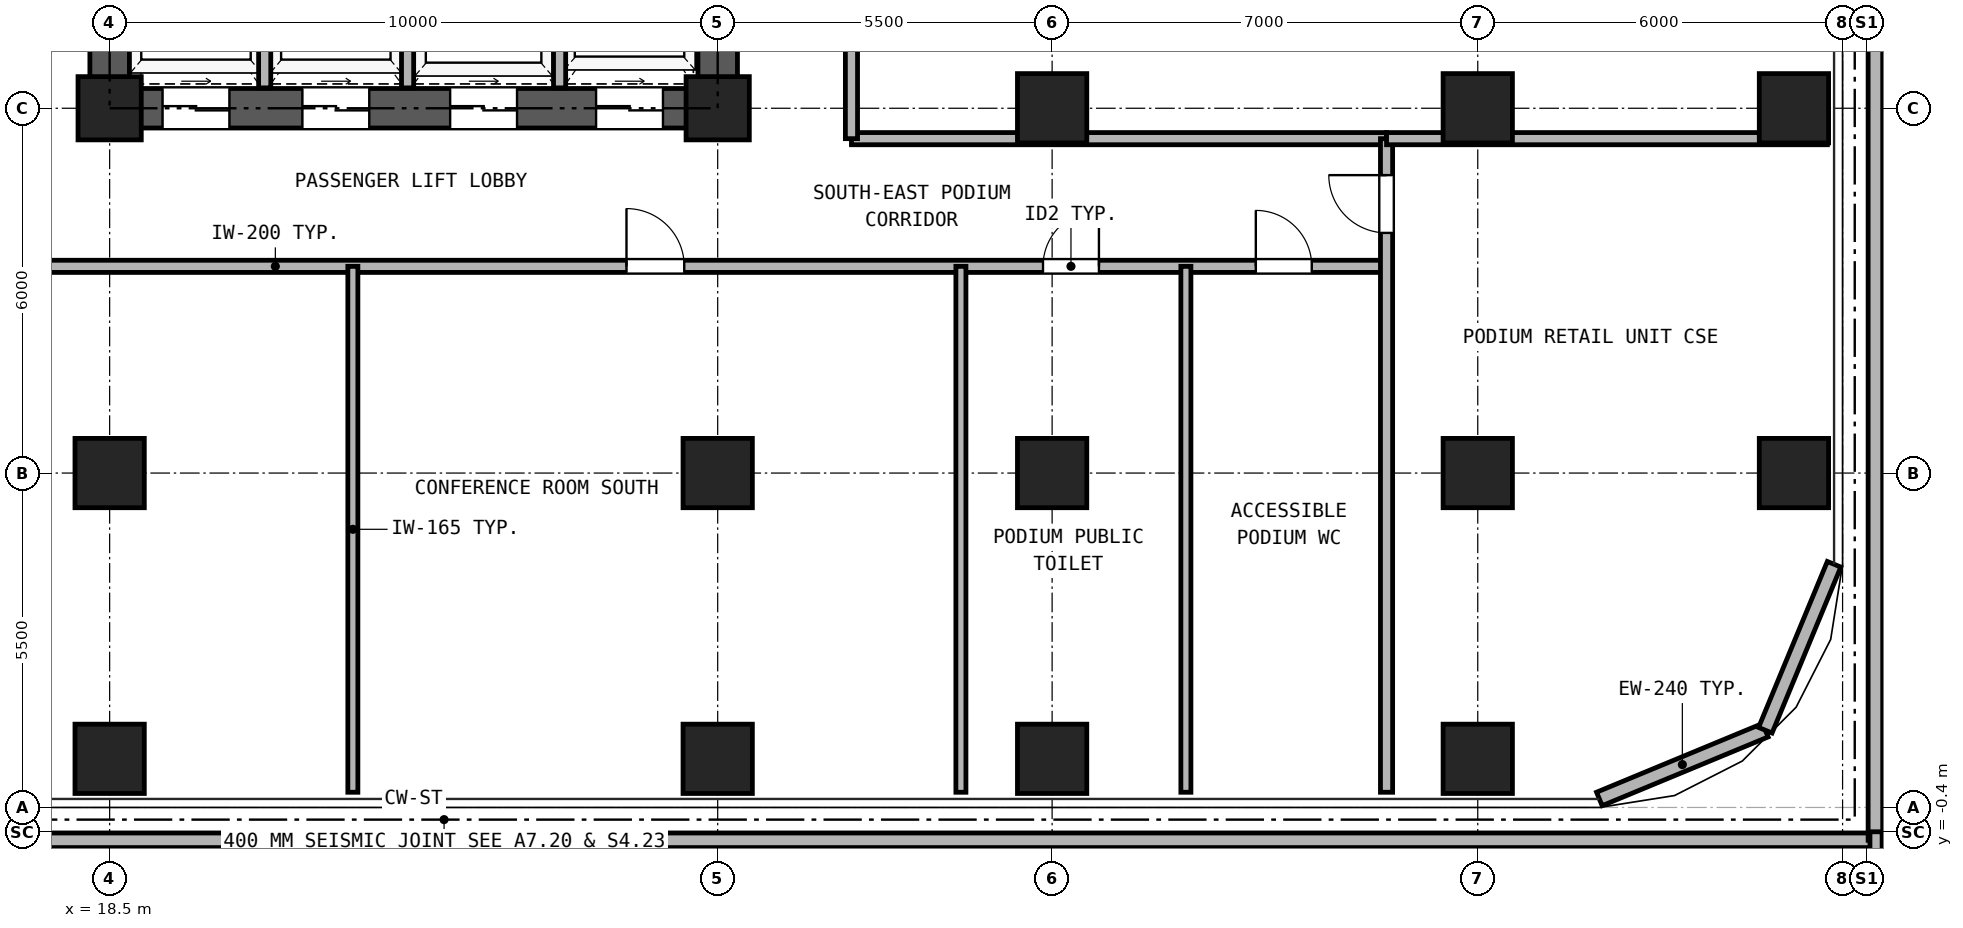
"""IFC4 building model, lengths in metres.
Left out: names, types, materials, properties, quantities, classifications, styles, units other than length and angle.
Written with IfcOpenShell. Run it as: python <this file> out.ifc"""

import sys

from ifc_helpers import new_model, si_unit, direction, frame, frame_2d, origin, origin_2d, place, context, subcontext, project, spatial, rectangle, hollow_rectangle, extrude, source, transform, mapped, element, fill, save


model = new_model("IFC4")
c1 = context("Model", 3, precision=1e-05, world=origin(), true_north=direction((0.0, 1.0)))
c2 = subcontext(c1, "Body", "Model", "MODEL_VIEW")
j1 = project(units=[si_unit("LENGTHUNIT", "METRE"), si_unit("PLANEANGLEUNIT", "RADIAN")], contexts=[c1])
p1 = place(None, origin())
s1 = spatial("IfcSite", under=j1, at=p1, CompositionType="ELEMENT")
p2 = place(p1, origin())
s2 = spatial("IfcBuilding", under=s1, at=p2, CompositionType="ELEMENT")
p3 = place(p2, frame((0.0, 0.0, 9.0)))
s3 = spatial("IfcBuildingStorey", under=s2, at=p3, CompositionType="ELEMENT", Elevation=9.0)
m1 = source(origin(), c2, "Body", "SweptSolid", [
    extrude(hollow_rectangle(XDim=1.14, YDim=1.14, WallThickness=0.07, at=origin_2d()), origin(), (0.0, 0.0, 1.0), 4.18),
])
for number, where, z_axis, x_axis in (
    (1, (18.5, 0.8, 0.0), (0.0, 0.0, 1.0), (1.0, 0.0, 0.0)),
    (2, (28.5, 0.8, 0.0), (0.0, 0.0, 1.0), (1.0, 0.0, 0.0)),
    (3, (34.0, 0.8, 0.0), (0.0, 0.0, 1.0), (1.0, 0.0, 0.0)),
    (4, (41.0, 0.8, 0.0), (0.0, 0.0, 1.0), (1.0, 0.0, 0.0)),
    (5, (46.2, 5.5, 0.0), (0.0, 0.0, 1.0), (1.0, 0.0, 0.0)),
    (6, (46.2, 11.5, 0.0), (0.0, 0.0, 1.0), (1.0, 0.0, 0.0)),
    (7, (18.5, 5.5, 0.0), (0.0, 0.0, 1.0), (1.0, 0.0, 0.0)),
):
    element("IfcColumn", number, at=place(p3, frame(where, z_axis=z_axis, x_axis=x_axis)), inside=s3, PredefinedType="COLUMN", context=c2, shape_type="MappedRepresentation", body=[
        mapped(m1, transform((0.0, 0.0, 0.0), x_axis=(1.0, 0.0, 0.0), y_axis=(0.0, 1.0, 0.0), z_axis=(0.0, 0.0, 1.0), scale=1.0)),
    ])
m2 = source(origin(), c2, "Body", "SweptSolid", [
    extrude(hollow_rectangle(XDim=1.04, YDim=1.04, WallThickness=0.065, at=origin_2d()), origin(), (0.0, 0.0, 1.0), 4.18),
])
p4 = place(p3, frame((18.5, 11.5, 0.0), z_axis=(0.0, 0.0, 1.0), x_axis=(1.0, 0.0, 0.0)))
e8 = element("IfcColumn", 8, at=p4, inside=s3, PredefinedType="COLUMN", context=c2, shape_type="MappedRepresentation", body=[
    mapped(m2, transform((0.0, 0.0, 0.0), x_axis=(1.0, 0.0, 0.0), y_axis=(0.0, 1.0, 0.0), z_axis=(0.0, 0.0, 1.0), scale=1.0)),
])
p5 = place(p3, frame((28.5, 5.5, 0.0), z_axis=(0.0, 0.0, 1.0), x_axis=(1.0, 0.0, 0.0)))
e9 = element("IfcColumn", 9, at=p5, inside=s3, PredefinedType="COLUMN", context=c2, shape_type="MappedRepresentation", body=[
    mapped(m1, transform((0.0, 0.0, 0.0), x_axis=(1.0, 0.0, 0.0), y_axis=(0.0, 1.0, 0.0), z_axis=(0.0, 0.0, 1.0), scale=1.0)),
])
p6 = place(p3, frame((28.5, 11.5, 0.0), z_axis=(0.0, 0.0, 1.0), x_axis=(1.0, 0.0, 0.0)))
e10 = element("IfcColumn", 10, at=p6, inside=s3, PredefinedType="COLUMN", context=c2, shape_type="MappedRepresentation", body=[
    mapped(m2, transform((0.0, 0.0, 0.0), x_axis=(1.0, 0.0, 0.0), y_axis=(0.0, 1.0, 0.0), z_axis=(0.0, 0.0, 1.0), scale=1.0)),
])
for number, where, z_axis, x_axis in (
    (11, (34.0, 5.5, 0.0), (0.0, 0.0, 1.0), (1.0, 0.0, 0.0)),
    (12, (34.0, 11.5, 0.0), (0.0, 0.0, 1.0), (1.0, 0.0, 0.0)),
    (13, (41.0, 5.5, 0.0), (0.0, 0.0, 1.0), (1.0, 0.0, 0.0)),
    (14, (41.0, 11.5, 0.0), (0.0, 0.0, 1.0), (1.0, 0.0, 0.0)),
):
    element("IfcColumn", number, at=place(p3, frame(where, z_axis=z_axis, x_axis=x_axis)), inside=s3, PredefinedType="COLUMN", context=c2, shape_type="MappedRepresentation", body=[
        mapped(m1, transform((0.0, 0.0, 0.0), x_axis=(1.0, 0.0, 0.0), y_axis=(0.0, 1.0, 0.0), z_axis=(0.0, 0.0, 1.0), scale=1.0)),
    ])
for number, where, z_axis, x_axis in (
    (15, (43.0, 0.14, 0.0), (0.0, 0.0, 1.0), (0.924, 0.383, 0.0)),
    (16, (45.729, 1.271, 0.0), (0.0, 0.0, 1.0), (0.383, 0.924, 0.0)),
):
    element("IfcWall", number, at=place(p3, frame(where, z_axis=z_axis, x_axis=x_axis)), inside=s3, PredefinedType="SOLIDWALL", context=c2, shape_type="SweptSolid", body=[
        extrude(rectangle(XDim=2.954, YDim=0.24, at=frame_2d((1.477, 0.0))), origin(), (0.0, 0.0, 1.0), 4.18),
    ])
p7 = place(p3, frame((0.2, -0.54, 0.0), z_axis=(0.0, 0.0, 1.0), x_axis=(1.0, 0.0, 0.0)))
e17 = element("IfcWall", 17, at=p7, inside=s3, PredefinedType="SOLIDWALL", context=c2, shape_type="SweptSolid", body=[
    extrude(rectangle(XDim=47.34, YDim=0.24, at=frame_2d((23.67, 0.0))), origin(), (0.0, 0.0, 1.0), 4.18),
])
p8 = place(p3, frame((47.54, -0.54, 0.0), z_axis=(0.0, 0.0, 1.0), x_axis=(0.0, 1.0, 0.0)))
e18 = element("IfcWall", 18, at=p8, inside=s3, PredefinedType="SOLIDWALL", context=c2, shape_type="SweptSolid", body=[
    extrude(rectangle(XDim=40.89, YDim=0.24, at=frame_2d((20.445, 0.0))), origin(), (0.0, 0.0, 1.0), 4.18),
])
p9 = place(p3, frame((18.175, 11.5, 0.0), z_axis=(0.0, 0.0, 1.0), x_axis=(1.0, 0.0, 0.0)))
e19 = element("IfcWall", 19, at=p9, inside=s3, PredefinedType="SHEAR", context=c2, shape_type="SweptSolid", body=[
    extrude(rectangle(XDim=10.65, YDim=0.65, at=frame_2d((5.325, 0.0))), origin(), (0.0, 0.0, 1.0), 4.18),
])
p10 = place(p9, frame((1.195, 0.0, 0.0)))
e20 = element("IfcOpeningElement", 20, at=p10, cuts=e19, PredefinedType="OPENING", context=c2, shape_type="SweptSolid", body=[
    extrude(rectangle(XDim=1.1, YDim=2.25, at=frame_2d((0.55, 1.125))), frame((0.0, 0.335, 0.0), z_axis=(0.0, -1.0, 0.0), x_axis=(1.0, 0.0, 0.0)), (0.0, 0.0, 1.0), 0.67),
])
p11 = place(p9, frame((3.495, 0.0, 0.0)))
e21 = element("IfcOpeningElement", 21, at=p11, cuts=e19, PredefinedType="OPENING", context=c2, shape_type="SweptSolid", body=[
    extrude(rectangle(XDim=1.1, YDim=2.25, at=frame_2d((0.55, 1.125))), frame((0.0, 0.335, 0.0), z_axis=(0.0, -1.0, 0.0), x_axis=(1.0, 0.0, 0.0)), (0.0, 0.0, 1.0), 0.67),
])
p12 = place(p9, frame((5.925, 0.0, 0.0)))
e22 = element("IfcOpeningElement", 22, at=p12, cuts=e19, PredefinedType="OPENING", context=c2, shape_type="SweptSolid", body=[
    extrude(rectangle(XDim=1.1, YDim=2.25, at=frame_2d((0.55, 1.125))), frame((0.0, 0.335, 0.0), z_axis=(0.0, -1.0, 0.0), x_axis=(1.0, 0.0, 0.0)), (0.0, 0.0, 1.0), 0.67),
])
p13 = place(p9, frame((8.325, 0.0, 0.0)))
e23 = element("IfcOpeningElement", 23, at=p13, cuts=e19, PredefinedType="OPENING", context=c2, shape_type="SweptSolid", body=[
    extrude(rectangle(XDim=1.1, YDim=2.25, at=frame_2d((0.55, 1.125))), frame((0.0, 0.335, 0.0), z_axis=(0.0, -1.0, 0.0), x_axis=(1.0, 0.0, 0.0)), (0.0, 0.0, 1.0), 0.67),
])
p14 = place(p3, frame((18.5, 11.825, 0.0), z_axis=(0.0, 0.0, 1.0), x_axis=(0.0, 1.0, 0.0)))
e24 = element("IfcWall", 24, at=p14, inside=s3, PredefinedType="SHEAR", context=c2, shape_type="SweptSolid", body=[
    extrude(rectangle(XDim=16.6, YDim=0.65, at=frame_2d((8.3, 0.0))), origin(), (0.0, 0.0, 1.0), 4.18),
])
p15 = place(p14, frame((7.325, 0.0, 0.0)))
e25 = element("IfcOpeningElement", 25, at=p15, cuts=e24, PredefinedType="OPENING", context=c2, shape_type="SweptSolid", body=[
    extrude(rectangle(XDim=1.15, YDim=2.2, at=frame_2d((0.575, 1.1))), frame((0.0, 0.335, 0.0), z_axis=(0.0, -1.0, 0.0), x_axis=(1.0, 0.0, 0.0)), (0.0, 0.0, 1.0), 0.67),
])
p16 = place(p3, frame((28.5, 11.825, 0.0), z_axis=(0.0, 0.0, 1.0), x_axis=(0.0, 1.0, 0.0)))
e26 = element("IfcWall", 26, at=p16, inside=s3, PredefinedType="SHEAR", context=c2, shape_type="SweptSolid", body=[
    extrude(rectangle(XDim=16.6, YDim=0.65, at=frame_2d((8.3, 0.0))), origin(), (0.0, 0.0, 1.0), 4.18),
])
p17 = place(p16, frame((7.325, 0.0, 0.0)))
e27 = element("IfcOpeningElement", 27, at=p17, cuts=e26, PredefinedType="OPENING", context=c2, shape_type="SweptSolid", body=[
    extrude(rectangle(XDim=1.15, YDim=2.2, at=frame_2d((0.575, 1.1))), frame((0.0, 0.335, 0.0), z_axis=(0.0, -1.0, 0.0), x_axis=(1.0, 0.0, 0.0)), (0.0, 0.0, 1.0), 0.67),
])
for number, where, z_axis, x_axis in (
    (28, (21.05, 11.835, 0.0), (0.0, 0.0, 1.0), (0.0, 1.0, 0.0)),
    (29, (23.4, 11.835, 0.0), (0.0, 0.0, 1.0), (0.0, 1.0, 0.0)),
    (30, (25.9, 11.835, 0.0), (0.0, 0.0, 1.0), (0.0, 1.0, 0.0)),
):
    element("IfcWall", number, at=place(p3, frame(where, z_axis=z_axis, x_axis=x_axis)), inside=s3, PredefinedType="PARTITIONING", context=c2, shape_type="SweptSolid", body=[
        extrude(rectangle(XDim=3.165, YDim=0.2, at=frame_2d((1.583, 0.0))), origin(), (0.0, 0.0, 1.0), 4.18),
    ])
p18 = place(p3, frame((7.5, 8.9, 0.0), z_axis=(0.0, 0.0, 1.0), x_axis=(1.0, 0.0, 0.0)))
e31 = element("IfcWall", 31, at=p18, inside=s3, PredefinedType="PARTITIONING", context=c2, shape_type="SweptSolid", body=[
    extrude(rectangle(XDim=32.0, YDim=0.2, at=frame_2d((16.0, 0.0))), origin(), (0.0, 0.0, 1.0), 4.18),
])
p19 = place(p18, frame((7.0, 0.0, 0.0)))
e32 = element("IfcOpeningElement", 32, at=p19, cuts=e31, PredefinedType="OPENING", context=c2, shape_type="SweptSolid", body=[
    extrude(rectangle(XDim=0.95, YDim=2.15, at=frame_2d((0.475, 1.075))), frame((0.0, 0.11, 0.0), z_axis=(0.0, -1.0, 0.0), x_axis=(1.0, 0.0, 0.0)), (0.0, 0.0, 1.0), 0.22),
])
p20 = place(p18, frame((19.5, 0.0, 0.0)))
e33 = element("IfcOpeningElement", 33, at=p20, cuts=e31, PredefinedType="OPENING", context=c2, shape_type="SweptSolid", body=[
    extrude(rectangle(XDim=0.95, YDim=2.15, at=frame_2d((0.475, 1.075))), frame((0.0, 0.11, 0.0), z_axis=(0.0, -1.0, 0.0), x_axis=(1.0, 0.0, 0.0)), (0.0, 0.0, 1.0), 0.22),
])
p21 = place(p18, frame((26.35, 0.0, 0.0)))
e34 = element("IfcOpeningElement", 34, at=p21, cuts=e31, PredefinedType="OPENING", context=c2, shape_type="SweptSolid", body=[
    extrude(rectangle(XDim=0.92, YDim=2.1, at=frame_2d((0.46, 1.05))), frame((0.0, 0.11, 0.0), z_axis=(0.0, -1.0, 0.0), x_axis=(1.0, 0.0, 0.0)), (0.0, 0.0, 1.0), 0.22),
])
p22 = place(p18, frame((29.85, 0.0, 0.0)))
e35 = element("IfcOpeningElement", 35, at=p22, cuts=e31, PredefinedType="OPENING", context=c2, shape_type="SweptSolid", body=[
    extrude(rectangle(XDim=0.92, YDim=2.1, at=frame_2d((0.46, 1.05))), frame((0.0, 0.11, 0.0), z_axis=(0.0, -1.0, 0.0), x_axis=(1.0, 0.0, 0.0)), (0.0, 0.0, 1.0), 0.22),
])
p23 = place(p3, frame((30.7, 11.0, 0.0), z_axis=(0.0, 0.0, 1.0), x_axis=(1.0, 0.0, 0.0)))
e36 = element("IfcWall", 36, at=p23, inside=s3, PredefinedType="PARTITIONING", context=c2, shape_type="SweptSolid", body=[
    extrude(rectangle(XDim=8.8, YDim=0.2, at=frame_2d((4.4, 0.0))), origin(), (0.0, 0.0, 1.0), 4.18),
])
p24 = place(p3, frame((30.7, 11.0, 0.0), z_axis=(0.0, 0.0, 1.0), x_axis=(0.0, 1.0, 0.0)))
e37 = element("IfcWall", 37, at=p24, inside=s3, PredefinedType="PARTITIONING", context=c2, shape_type="SweptSolid", body=[
    extrude(rectangle(XDim=18.25, YDim=0.2, at=frame_2d((9.125, 0.0))), origin(), (0.0, 0.0, 1.0), 4.18),
])
p25 = place(p24, frame((8.625, 0.0, 0.0)))
e38 = element("IfcOpeningElement", 38, at=p25, cuts=e37, PredefinedType="OPENING", context=c2, shape_type="SweptSolid", body=[
    extrude(rectangle(XDim=0.95, YDim=2.15, at=frame_2d((0.475, 1.075))), frame((0.0, 0.11, 0.0), z_axis=(0.0, -1.0, 0.0), x_axis=(1.0, 0.0, 0.0)), (0.0, 0.0, 1.0), 0.22),
])
p26 = place(p3, frame((39.5, 0.25, 0.0), z_axis=(0.0, 0.0, 1.0), x_axis=(0.0, 1.0, 0.0)))
e39 = element("IfcWall", 39, at=p26, inside=s3, PredefinedType="PARTITIONING", context=c2, shape_type="SweptSolid", body=[
    extrude(rectangle(XDim=10.75, YDim=0.2, at=frame_2d((5.375, 0.0))), origin(), (0.0, 0.0, 1.0), 4.18),
])
p27 = place(p26, frame((9.2, 0.0, 0.0)))
e40 = element("IfcOpeningElement", 40, at=p27, cuts=e39, PredefinedType="OPENING", context=c2, shape_type="SweptSolid", body=[
    extrude(rectangle(XDim=0.95, YDim=2.15, at=frame_2d((0.475, 1.075))), frame((0.0, 0.11, 0.0), z_axis=(0.0, -1.0, 0.0), x_axis=(1.0, 0.0, 0.0)), (0.0, 0.0, 1.0), 0.22),
])
p28 = place(p3, frame((39.5, 11.0, 0.0), z_axis=(0.0, 0.0, 1.0), x_axis=(1.0, 0.0, 0.0)))
e41 = element("IfcWall", 41, at=p28, inside=s3, PredefinedType="PARTITIONING", context=c2, shape_type="SweptSolid", body=[
    extrude(rectangle(XDim=7.25, YDim=0.2, at=frame_2d((3.625, 0.0))), origin(), (0.0, 0.0, 1.0), 4.18),
])
for number, where, z_axis, x_axis in (
    (42, (22.5, 0.25, 0.0), (0.0, 0.0, 1.0), (0.0, 1.0, 0.0)),
    (43, (32.5, 0.25, 0.0), (0.0, 0.0, 1.0), (0.0, 1.0, 0.0)),
    (44, (36.2, 0.25, 0.0), (0.0, 0.0, 1.0), (0.0, 1.0, 0.0)),
):
    element("IfcWall", number, at=place(p3, frame(where, z_axis=z_axis, x_axis=x_axis)), inside=s3, PredefinedType="PARTITIONING", context=c2, shape_type="SweptSolid", body=[
        extrude(rectangle(XDim=8.65, YDim=0.165, at=frame_2d((4.325, 0.0))), origin(), (0.0, 0.0, 1.0), 4.18),
    ])
p29 = place(p3, frame((47.55, -10.95, 0.0), z_axis=(0.0, 0.0, 1.0), x_axis=(0.0, 1.0, 0.0)))
e45 = element("IfcWall", 45, at=p29, inside=s3, PredefinedType="PARTITIONING", context=c2, shape_type="SweptSolid", body=[
    extrude(rectangle(XDim=10.55, YDim=0.2, at=frame_2d((5.275, 0.0))), origin(), (0.0, 0.0, 1.0), 4.18),
])
p30 = place(p29, frame((5.35, 0.0, 0.0)))
e46 = element("IfcOpeningElement", 46, at=p30, cuts=e45, PredefinedType="OPENING", context=c2, shape_type="SweptSolid", body=[
    extrude(rectangle(XDim=1.3, YDim=2.2, at=frame_2d((0.65, 1.1))), frame((0.0, 0.11, 0.0), z_axis=(0.0, -1.0, 0.0), x_axis=(1.0, 0.0, 0.0)), (0.0, 0.0, 1.0), 0.22),
])
p31 = place(p10, frame((1.1, 0.0, 0.0), z_axis=(0.0, 0.0, 1.0), x_axis=(-1.0, 0.0, 0.0)))
e47 = element("IfcDoor", 47, at=p31, inside=s3, OperationType="DOUBLE_DOOR_SLIDING", PredefinedType="DOOR", context=c2, shape_type="SweptSolid", body=[
    extrude(rectangle(XDim=1.1, YDim=2.25, at=frame_2d((0.55, 1.125))), frame((0.0, 0.025, 0.0), z_axis=(0.0, -1.0, 0.0), x_axis=(1.0, 0.0, 0.0)), (0.0, 0.0, 1.0), 0.05),
])
fill(e20, e47)
p32 = place(p11, frame((1.1, 0.0, 0.0), z_axis=(0.0, 0.0, 1.0), x_axis=(-1.0, 0.0, 0.0)))
e48 = element("IfcDoor", 48, at=p32, inside=s3, OperationType="DOUBLE_DOOR_SLIDING", PredefinedType="DOOR", context=c2, shape_type="SweptSolid", body=[
    extrude(rectangle(XDim=1.1, YDim=2.25, at=frame_2d((0.55, 1.125))), frame((0.0, 0.025, 0.0), z_axis=(0.0, -1.0, 0.0), x_axis=(1.0, 0.0, 0.0)), (0.0, 0.0, 1.0), 0.05),
])
fill(e21, e48)
p33 = place(p12, frame((1.1, 0.0, 0.0), z_axis=(0.0, 0.0, 1.0), x_axis=(-1.0, 0.0, 0.0)))
e49 = element("IfcDoor", 49, at=p33, inside=s3, OperationType="DOUBLE_DOOR_SLIDING", PredefinedType="DOOR", context=c2, shape_type="SweptSolid", body=[
    extrude(rectangle(XDim=1.1, YDim=2.25, at=frame_2d((0.55, 1.125))), frame((0.0, 0.025, 0.0), z_axis=(0.0, -1.0, 0.0), x_axis=(1.0, 0.0, 0.0)), (0.0, 0.0, 1.0), 0.05),
])
fill(e22, e49)
p34 = place(p13, frame((1.1, 0.0, 0.0), z_axis=(0.0, 0.0, 1.0), x_axis=(-1.0, 0.0, 0.0)))
e50 = element("IfcDoor", 50, at=p34, inside=s3, OperationType="DOUBLE_DOOR_SLIDING", PredefinedType="DOOR", context=c2, shape_type="SweptSolid", body=[
    extrude(rectangle(XDim=1.1, YDim=2.25, at=frame_2d((0.55, 1.125))), frame((0.0, 0.025, 0.0), z_axis=(0.0, -1.0, 0.0), x_axis=(1.0, 0.0, 0.0)), (0.0, 0.0, 1.0), 0.05),
])
fill(e23, e50)
p35 = place(p20, frame((0.95, 0.0, 0.0), z_axis=(0.0, 0.0, 1.0), x_axis=(-1.0, 0.0, 0.0)))
e51 = element("IfcDoor", 51, at=p35, inside=s3, OperationType="SINGLE_SWING_LEFT", PredefinedType="DOOR", context=c2, shape_type="SweptSolid", body=[
    extrude(rectangle(XDim=0.95, YDim=2.15, at=frame_2d((0.475, 1.075))), frame((0.0, 0.025, 0.0), z_axis=(0.0, -1.0, 0.0), x_axis=(1.0, 0.0, 0.0)), (0.0, 0.0, 1.0), 0.05),
])
fill(e33, e51)
p36 = place(p21, frame((0.92, 0.0, 0.0), z_axis=(0.0, 0.0, 1.0), x_axis=(-1.0, 0.0, 0.0)))
e52 = element("IfcDoor", 52, at=p36, inside=s3, OperationType="SINGLE_SWING_RIGHT", PredefinedType="DOOR", context=c2, shape_type="SweptSolid", body=[
    extrude(rectangle(XDim=0.92, YDim=2.1, at=frame_2d((0.46, 1.05))), frame((0.0, 0.025, 0.0), z_axis=(0.0, -1.0, 0.0), x_axis=(1.0, 0.0, 0.0)), (0.0, 0.0, 1.0), 0.05),
])
fill(e34, e52)
p37 = place(p22, frame((0.92, 0.0, 0.0), z_axis=(0.0, 0.0, 1.0), x_axis=(-1.0, 0.0, 0.0)))
e53 = element("IfcDoor", 53, at=p37, inside=s3, OperationType="SINGLE_SWING_LEFT", PredefinedType="DOOR", context=c2, shape_type="SweptSolid", body=[
    extrude(rectangle(XDim=0.92, YDim=2.1, at=frame_2d((0.46, 1.05))), frame((0.0, 0.025, 0.0), z_axis=(0.0, -1.0, 0.0), x_axis=(1.0, 0.0, 0.0)), (0.0, 0.0, 1.0), 0.05),
])
fill(e35, e53)
p38 = place(p27, origin())
e54 = element("IfcDoor", 54, at=p38, inside=s3, OperationType="SINGLE_SWING_RIGHT", PredefinedType="DOOR", context=c2, shape_type="SweptSolid", body=[
    extrude(rectangle(XDim=0.95, YDim=2.15, at=frame_2d((0.475, 1.075))), frame((0.0, 0.025, 0.0), z_axis=(0.0, -1.0, 0.0), x_axis=(1.0, 0.0, 0.0)), (0.0, 0.0, 1.0), 0.05),
])
fill(e40, e54)
save(model, sys.argv[1])
